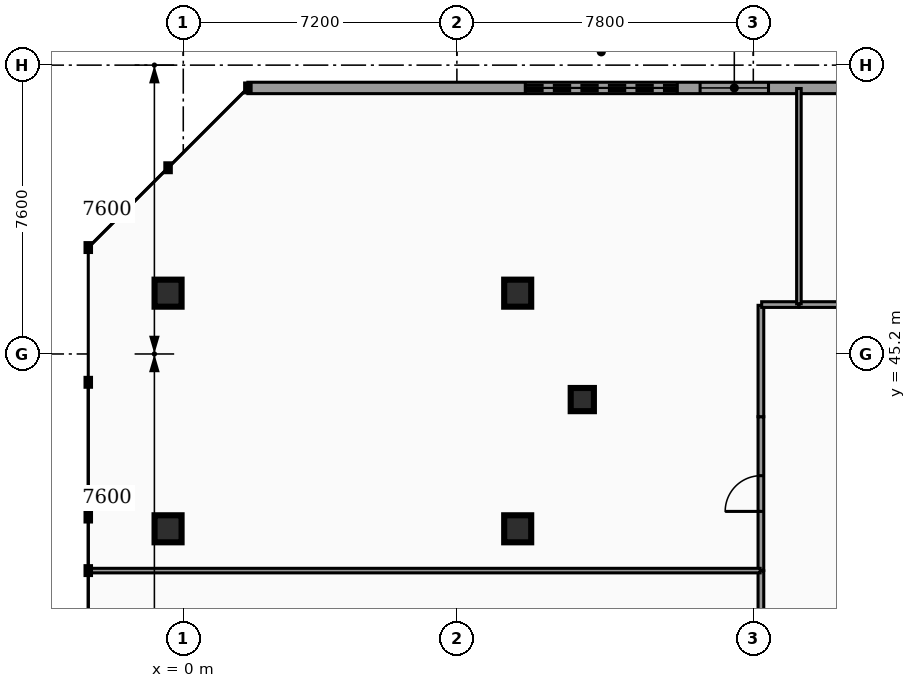
"""IFC4 building model, lengths in metres.
Left out: names, types, materials, properties, quantities, classifications, styles, units other than length and angle.
Written with IfcOpenShell. Run it as: python <this file> out.ifc"""

import sys

from ifc_helpers import new_model, si_unit, direction, frame, frame_2d, origin, origin_2d, place, context, subcontext, project, spatial, rectangle, hollow_circle, extrude, element, fill, save


model = new_model("IFC4")
c1 = context("Model", 3, precision=1e-05, world=origin(), true_north=direction((0.0, 1.0)))
c2 = subcontext(c1, "Body", "Model", "MODEL_VIEW")
j1 = project(units=[si_unit("LENGTHUNIT", "METRE"), si_unit("PLANEANGLEUNIT", "RADIAN")], contexts=[c1])
p1 = place(None, origin())
s1 = spatial("IfcSite", under=j1, at=p1, CompositionType="ELEMENT")
p2 = place(p1, origin())
s2 = spatial("IfcBuilding", under=s1, at=p2, CompositionType="ELEMENT")
p3 = place(p2, origin())
s3 = spatial("IfcBuildingStorey", under=s2, at=p3, CompositionType="ELEMENT", Elevation=0.0)
p4 = place(p3, frame((10.5, 44.0, 0.0), z_axis=(0.0, 0.0, 1.0), x_axis=(1.0, 0.0, 0.0)))
e1 = element("IfcColumn", 1, at=p4, inside=s3, PredefinedType="COLUMN", context=c2, shape_type="SweptSolid", body=[
    extrude(hollow_circle(Radius=0.305, WallThickness=0.025, at=origin_2d()), origin(), (0.0, 0.0, 1.0), 4.82),
])
for number, where, z_axis, x_axis in (
    (2, (-0.4, 40.6, 0.0), (0.0, 0.0, 1.0), (1.0, 0.0, 0.0)),
    (3, (8.8, 40.6, 0.0), (0.0, 0.0, 1.0), (1.0, 0.0, 0.0)),
    (4, (-0.4, 46.8, 0.0), (0.0, 0.0, 1.0), (1.0, 0.0, 0.0)),
    (5, (8.8, 46.8, 0.0), (0.0, 0.0, 1.0), (1.0, 0.0, 0.0)),
):
    element("IfcColumn", number, at=place(p3, frame(where, z_axis=z_axis, x_axis=x_axis)), inside=s3, PredefinedType="COLUMN", context=c2, shape_type="SweptSolid", body=[
        extrude(hollow_circle(Radius=0.355, WallThickness=0.03, at=origin_2d()), origin(), (0.0, 0.0, 1.0), 4.82),
    ])
p5 = place(p3, frame((1.7, 52.2, 0.0), z_axis=(0.0, 0.0, 1.0), x_axis=(1.0, 0.0, 0.0)))
e6 = element("IfcWall", 6, at=p5, inside=s3, PredefinedType="STANDARD", context=c2, shape_type="SweptSolid", body=[
    extrude(rectangle(XDim=73.4, YDim=0.3, at=frame_2d((36.7, 0.0))), origin(), (0.0, 0.0, 1.0), 4.205),
])
p6 = place(p5, frame((7.3, 0.0, 0.0)))
e7 = element("IfcOpeningElement", 7, at=p6, cuts=e6, PredefinedType="OPENING", context=c2, shape_type="SweptSolid", body=[
    extrude(rectangle(XDim=4.0, YDim=3.5, at=frame_2d((2.0, 1.75))), frame((0.0, 0.16, 0.0), z_axis=(0.0, -1.0, 0.0), x_axis=(1.0, 0.0, 0.0)), (0.0, 0.0, 1.0), 0.32),
])
p7 = place(p5, frame((31.45, 0.0, 0.0)))
e8 = element("IfcOpeningElement", 8, at=p7, cuts=e6, PredefinedType="OPENING", context=c2, shape_type="SweptSolid", body=[
    extrude(rectangle(XDim=2.4, YDim=2.6, at=frame_2d((1.2, 1.3))), frame((0.0, 0.16, 0.0), z_axis=(0.0, -1.0, 0.0), x_axis=(1.0, 0.0, 0.0)), (0.0, 0.0, 1.0), 0.32),
])
p8 = place(p5, frame((44.2, 0.0, 1.0)))
e9 = element("IfcOpeningElement", 9, at=p8, cuts=e6, PredefinedType="OPENING", context=c2, shape_type="SweptSolid", body=[
    extrude(rectangle(XDim=1.2, YDim=1.5, at=frame_2d((0.6, 0.75))), frame((0.0, 0.16, 0.0), z_axis=(0.0, -1.0, 0.0), x_axis=(1.0, 0.0, 0.0)), (0.0, 0.0, 1.0), 0.32),
])
p9 = place(p5, frame((11.9, 0.0, 0.95)))
e10 = element("IfcOpeningElement", 10, at=p9, cuts=e6, PredefinedType="OPENING", context=c2, shape_type="SweptSolid", body=[
    extrude(rectangle(XDim=1.8, YDim=2.1, at=frame_2d((0.9, 1.05))), frame((0.0, 0.16, 0.0), z_axis=(0.0, -1.0, 0.0), x_axis=(1.0, 0.0, 0.0)), (0.0, 0.0, 1.0), 0.32),
])
p10 = place(p5, frame((59.8, 0.0, 0.95)))
e11 = element("IfcOpeningElement", 11, at=p10, cuts=e6, PredefinedType="OPENING", context=c2, shape_type="SweptSolid", body=[
    extrude(rectangle(XDim=1.8, YDim=2.1, at=frame_2d((0.9, 1.05))), frame((0.0, 0.16, 0.0), z_axis=(0.0, -1.0, 0.0), x_axis=(1.0, 0.0, 0.0)), (0.0, 0.0, 1.0), 0.32),
])
p11 = place(p5, frame((66.8, 0.0, 0.95)))
e12 = element("IfcOpeningElement", 12, at=p11, cuts=e6, PredefinedType="OPENING", context=c2, shape_type="SweptSolid", body=[
    extrude(rectangle(XDim=1.8, YDim=2.1, at=frame_2d((0.9, 1.05))), frame((0.0, 0.16, 0.0), z_axis=(0.0, -1.0, 0.0), x_axis=(1.0, 0.0, 0.0)), (0.0, 0.0, 1.0), 0.32),
])
p12 = place(p3, frame((15.2, 30.17, 0.0), z_axis=(0.0, 0.0, 1.0), x_axis=(0.0, 1.0, 0.0)))
e13 = element("IfcWall", 13, at=p12, inside=s3, PredefinedType="PARTITIONING", context=c2, shape_type="SweptSolid", body=[
    extrude(rectangle(XDim=9.325, YDim=0.15, at=frame_2d((4.663, 0.0))), origin(), (0.0, 0.0, 1.0), 3.777),
])
p13 = place(p3, frame((15.2, 39.505, 0.0), z_axis=(0.0, 0.0, 1.0), x_axis=(0.0, 1.0, 0.0)))
e14 = element("IfcWall", 14, at=p13, inside=s3, PredefinedType="PARTITIONING", context=c2, shape_type="SweptSolid", body=[
    extrude(rectangle(XDim=4.045, YDim=0.15, at=frame_2d((2.022, 0.0))), origin(), (0.0, 0.0, 1.0), 3.777),
])
p14 = place(p13, frame((1.552, 0.0, 0.0)))
e15 = element("IfcOpeningElement", 15, at=p14, cuts=e14, PredefinedType="OPENING", context=c2, shape_type="SweptSolid", body=[
    extrude(rectangle(XDim=0.94, YDim=2.05, at=frame_2d((0.47, 1.025))), frame((0.0, 0.085, 0.0), z_axis=(0.0, -1.0, 0.0), x_axis=(1.0, 0.0, 0.0)), (0.0, 0.0, 1.0), 0.17),
])
p15 = place(p3, frame((15.2, 43.55, 0.0), z_axis=(0.0, 0.0, 1.0), x_axis=(0.0, 1.0, 0.0)))
e16 = element("IfcWall", 16, at=p15, inside=s3, PredefinedType="PARTITIONING", context=c2, shape_type="SweptSolid", body=[
    extrude(rectangle(XDim=2.93, YDim=0.15, at=frame_2d((1.465, 0.0))), origin(), (0.0, 0.0, 1.0), 3.777),
])
p16 = place(p3, frame((15.22, 46.5, 0.0), z_axis=(0.0, 0.0, 1.0), x_axis=(1.0, 0.0, 0.0)))
e17 = element("IfcWall", 17, at=p16, inside=s3, PredefinedType="PARTITIONING", context=c2, shape_type="SweptSolid", body=[
    extrude(rectangle(XDim=0.975, YDim=0.15, at=frame_2d((0.488, 0.0))), origin(), (0.0, 0.0, 1.0), 3.777),
])
p17 = place(p3, frame((16.205, 46.5, 0.0), z_axis=(0.0, 0.0, 1.0), x_axis=(1.0, 0.0, 0.0)))
e18 = element("IfcWall", 18, at=p17, inside=s3, PredefinedType="PARTITIONING", context=c2, shape_type="SweptSolid", body=[
    extrude(rectangle(XDim=1.995, YDim=0.15, at=frame_2d((0.998, 0.0))), origin(), (0.0, 0.0, 1.0), 3.777),
])
p18 = place(p3, frame((-2.485, 39.5, 0.0), z_axis=(0.0, 0.0, 1.0), x_axis=(1.0, 0.0, 0.0)))
e19 = element("IfcWall", 19, at=p18, inside=s3, PredefinedType="PARTITIONING", context=c2, shape_type="SweptSolid", body=[
    extrude(rectangle(XDim=17.665, YDim=0.12, at=frame_2d((8.833, 0.0))), origin(), (0.0, 0.0, 1.0), 3.777),
])
p19 = place(p3, frame((16.2, 46.52, 0.0), z_axis=(0.0, 0.0, 1.0), x_axis=(0.0, 1.0, 0.0)))
e20 = element("IfcWall", 20, at=p19, inside=s3, PredefinedType="PARTITIONING", context=c2, shape_type="SweptSolid", body=[
    extrude(rectangle(XDim=5.665, YDim=0.12, at=frame_2d((2.833, 0.0))), origin(), (0.0, 0.0, 1.0), 3.777),
])
p20 = place(p6, origin())
e21 = element("IfcDoor", 21, at=p20, inside=s3, OperationType="ROLLINGUP", PredefinedType="GATE", context=c2, shape_type="SweptSolid", body=[
    extrude(rectangle(XDim=4.0, YDim=3.5, at=frame_2d((2.0, 1.75))), frame((0.0, 0.025, 0.0), z_axis=(0.0, -1.0, 0.0), x_axis=(1.0, 0.0, 0.0)), (0.0, 0.0, 1.0), 0.05),
])
fill(e7, e21)
p21 = place(p9, origin())
e22 = element("IfcWindow", 22, at=p21, inside=s3, PartitioningType="SINGLE_PANEL", PredefinedType="WINDOW", context=c2, shape_type="SweptSolid", body=[
    extrude(rectangle(XDim=1.8, YDim=2.1, at=frame_2d((0.9, 1.05))), frame((0.0, 0.03, 0.0), z_axis=(0.0, -1.0, 0.0), x_axis=(1.0, 0.0, 0.0)), (0.0, 0.0, 1.0), 0.06),
])
fill(e10, e22)
p22 = place(p14, origin())
e23 = element("IfcDoor", 23, at=p22, inside=s3, OperationType="SINGLE_SWING_LEFT", PredefinedType="DOOR", context=c2, shape_type="SweptSolid", body=[
    extrude(rectangle(XDim=0.94, YDim=2.05, at=frame_2d((0.47, 1.025))), frame((0.0, 0.025, 0.0), z_axis=(0.0, -1.0, 0.0), x_axis=(1.0, 0.0, 0.0)), (0.0, 0.0, 1.0), 0.05),
])
fill(e15, e23)
save(model, sys.argv[1])
